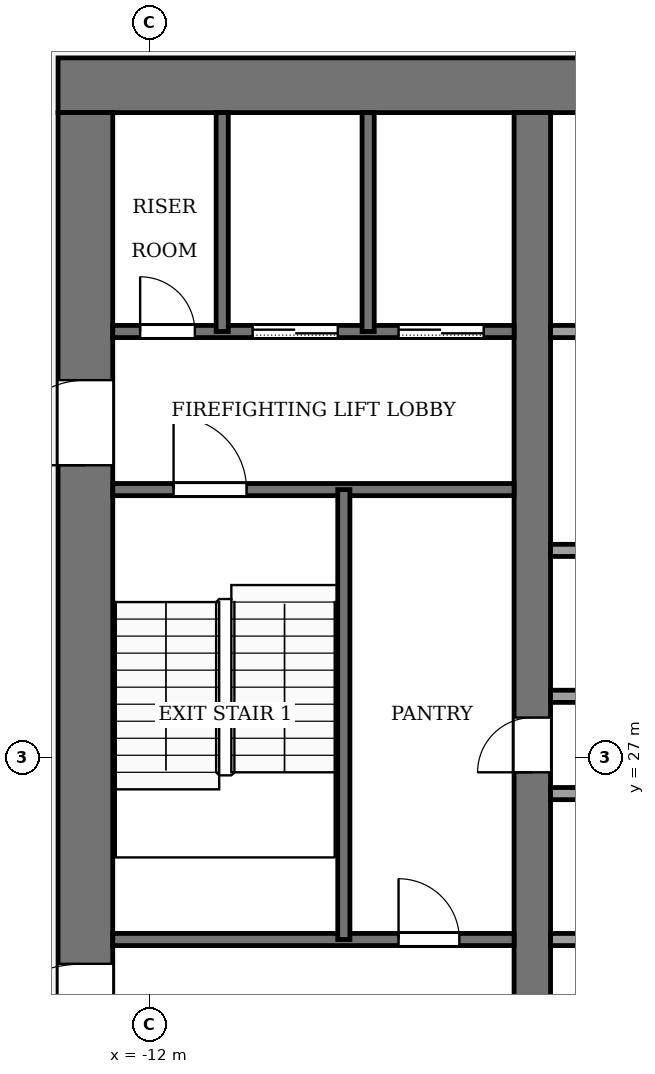
"""IFC4 building model, lengths in metres.
Left out: names, types, materials, properties, quantities, classifications, styles, units other than length and angle.
Written with IfcOpenShell. Run it as: python <this file> out.ifc"""

import sys

from ifc_helpers import new_model, si_unit, direction, frame, frame_2d, origin, place, context, subcontext, project, spatial, rectangle, extrude, element, fill, save


model = new_model("IFC4")
c1 = context("Model", 3, precision=1e-05, world=origin(), true_north=direction((0.0, 1.0)))
c2 = subcontext(c1, "Body", "Model", "MODEL_VIEW")
j1 = project(units=[si_unit("LENGTHUNIT", "METRE"), si_unit("PLANEANGLEUNIT", "RADIAN")], contexts=[c1])
p1 = place(None, origin())
s1 = spatial("IfcSite", under=j1, at=p1, CompositionType="ELEMENT")
p2 = place(p1, origin())
s2 = spatial("IfcBuilding", under=s1, at=p2, CompositionType="ELEMENT")
p3 = place(p2, frame((0.0, 0.0, 198.0)))
s3 = spatial("IfcBuildingStorey", under=s2, at=p3, CompositionType="ELEMENT", Elevation=198.0)
p4 = place(p3, frame((-13.5, 38.05, -0.13), z_axis=(0.0, 0.0, 1.0), x_axis=(1.0, 0.0, 0.0)))
e1 = element("IfcWall", 1, at=p4, inside=s3, PredefinedType="SHEAR", context=c2, shape_type="SweptSolid", body=[
    extrude(rectangle(XDim=27.0, YDim=0.9, at=frame_2d((13.5, 0.0))), origin(), (0.0, 0.0, 1.0), 4.0),
])
p5 = place(p3, frame((-13.05, 18.4, -0.13), z_axis=(0.0, 0.0, 1.0), x_axis=(0.0, 1.0, 0.0)))
e2 = element("IfcWall", 2, at=p5, inside=s3, PredefinedType="SHEAR", context=c2, shape_type="SweptSolid", body=[
    extrude(rectangle(XDim=19.2, YDim=0.9, at=frame_2d((9.6, 0.0))), origin(), (0.0, 0.0, 1.0), 4.0),
])
p6 = place(p5, frame((2.8, 0.0, 0.13)))
e3 = element("IfcOpeningElement", 3, at=p6, cuts=e2, PredefinedType="OPENING", context=c2, shape_type="SweptSolid", body=[
    extrude(rectangle(XDim=2.4, YDim=2.4, at=frame_2d((1.2, 1.2))), frame((0.0, 0.46, 0.0), z_axis=(0.0, -1.0, 0.0), x_axis=(1.0, 0.0, 0.0)), (0.0, 0.0, 1.0), 0.92),
])
p7 = place(p5, frame((13.4, 0.0, 0.13)))
e4 = element("IfcOpeningElement", 4, at=p7, cuts=e2, PredefinedType="OPENING", context=c2, shape_type="SweptSolid", body=[
    extrude(rectangle(XDim=1.4, YDim=2.2, at=frame_2d((0.7, 1.1))), frame((0.0, 0.46, 0.0), z_axis=(0.0, -1.0, 0.0), x_axis=(1.0, 0.0, 0.0)), (0.0, 0.0, 1.0), 0.92),
])
p8 = place(p3, frame((-5.7, 18.4, -0.13), z_axis=(0.0, 0.0, 1.0), x_axis=(0.0, 1.0, 0.0)))
e5 = element("IfcWall", 5, at=p8, inside=s3, PredefinedType="SHEAR", context=c2, shape_type="SweptSolid", body=[
    extrude(rectangle(XDim=19.2, YDim=0.6, at=frame_2d((9.6, 0.0))), origin(), (0.0, 0.0, 1.0), 4.0),
])
p9 = place(p8, frame((8.35, 0.0, 0.13)))
e6 = element("IfcOpeningElement", 6, at=p9, cuts=e5, PredefinedType="OPENING", context=c2, shape_type="SweptSolid", body=[
    extrude(rectangle(XDim=0.9, YDim=2.1, at=frame_2d((0.45, 1.05))), frame((0.0, 0.31, 0.0), z_axis=(0.0, -1.0, 0.0), x_axis=(1.0, 0.0, 0.0)), (0.0, 0.0, 1.0), 0.62),
])
p10 = place(p3, frame((-12.6, 24.0, 0.0), z_axis=(0.0, 0.0, 1.0), x_axis=(1.0, 0.0, 0.0)))
e7 = element("IfcWall", 7, at=p10, inside=s3, PredefinedType="PARTITIONING", context=c2, shape_type="SweptSolid", body=[
    extrude(rectangle(XDim=6.6, YDim=0.2, at=frame_2d((3.3, 0.0))), origin(), (0.0, 0.0, 1.0), 3.87),
])
p11 = place(p10, frame((4.7, 0.0, 0.0)))
e8 = element("IfcOpeningElement", 8, at=p11, cuts=e7, PredefinedType="OPENING", context=c2, shape_type="SweptSolid", body=[
    extrude(rectangle(XDim=1.0, YDim=2.1, at=frame_2d((0.5, 1.05))), frame((0.0, 0.11, 0.0), z_axis=(0.0, -1.0, 0.0), x_axis=(1.0, 0.0, 0.0)), (0.0, 0.0, 1.0), 0.22),
])
p12 = place(p3, frame((-5.4, 24.0, 0.0), z_axis=(0.0, 0.0, 1.0), x_axis=(1.0, 0.0, 0.0)))
e9 = element("IfcWall", 9, at=p12, inside=s3, PredefinedType="PARTITIONING", context=c2, shape_type="SweptSolid", body=[
    extrude(rectangle(XDim=10.8, YDim=0.2, at=frame_2d((5.4, 0.0))), origin(), (0.0, 0.0, 1.0), 3.87),
])
p13 = place(p12, frame((0.75, 0.0, 0.0)))
e10 = element("IfcOpeningElement", 10, at=p13, cuts=e9, PredefinedType="OPENING", context=c2, shape_type="SweptSolid", body=[
    extrude(rectangle(XDim=1.2, YDim=2.2, at=frame_2d((0.6, 1.1))), frame((0.0, 0.11, 0.0), z_axis=(0.0, -1.0, 0.0), x_axis=(1.0, 0.0, 0.0)), (0.0, 0.0, 1.0), 0.22),
])
p14 = place(p12, frame((3.45, 0.0, 0.0)))
e11 = element("IfcOpeningElement", 11, at=p14, cuts=e9, PredefinedType="OPENING", context=c2, shape_type="SweptSolid", body=[
    extrude(rectangle(XDim=1.2, YDim=2.2, at=frame_2d((0.6, 1.1))), frame((0.0, 0.11, 0.0), z_axis=(0.0, -1.0, 0.0), x_axis=(1.0, 0.0, 0.0)), (0.0, 0.0, 1.0), 0.22),
])
p15 = place(p12, frame((6.15, 0.0, 0.0)))
e12 = element("IfcOpeningElement", 12, at=p15, cuts=e9, PredefinedType="OPENING", context=c2, shape_type="SweptSolid", body=[
    extrude(rectangle(XDim=1.2, YDim=2.2, at=frame_2d((0.6, 1.1))), frame((0.0, 0.11, 0.0), z_axis=(0.0, -1.0, 0.0), x_axis=(1.0, 0.0, 0.0)), (0.0, 0.0, 1.0), 0.22),
])
p16 = place(p12, frame((8.85, 0.0, 0.0)))
e13 = element("IfcOpeningElement", 13, at=p16, cuts=e9, PredefinedType="OPENING", context=c2, shape_type="SweptSolid", body=[
    extrude(rectangle(XDim=1.2, YDim=2.2, at=frame_2d((0.6, 1.1))), frame((0.0, 0.11, 0.0), z_axis=(0.0, -1.0, 0.0), x_axis=(1.0, 0.0, 0.0)), (0.0, 0.0, 1.0), 0.22),
])
for number, where, z_axis, x_axis in (
    (14, (-5.4, 26.4, 0.0), (0.0, 0.0, 1.0), (1.0, 0.0, 0.0)),
    (15, (-5.4, 28.0, 0.0), (0.0, 0.0, 1.0), (1.0, 0.0, 0.0)),
):
    element("IfcWall", number, at=place(p3, frame(where, z_axis=z_axis, x_axis=x_axis)), inside=s3, PredefinedType="PARTITIONING", context=c2, shape_type="SweptSolid", body=[
        extrude(rectangle(XDim=10.8, YDim=0.2, at=frame_2d((5.4, 0.0))), origin(), (0.0, 0.0, 1.0), 3.87),
    ])
p17 = place(p3, frame((-5.4, 30.4, 0.0), z_axis=(0.0, 0.0, 1.0), x_axis=(1.0, 0.0, 0.0)))
e16 = element("IfcWall", 16, at=p17, inside=s3, PredefinedType="PARTITIONING", context=c2, shape_type="SweptSolid", body=[
    extrude(rectangle(XDim=10.8, YDim=0.2, at=frame_2d((5.4, 0.0))), origin(), (0.0, 0.0, 1.0), 3.87),
])
p18 = place(p17, frame((2.632, 0.0, 0.0)))
e17 = element("IfcOpeningElement", 17, at=p18, cuts=e16, PredefinedType="OPENING", context=c2, shape_type="SweptSolid", body=[
    extrude(rectangle(XDim=1.0, YDim=2.1, at=frame_2d((0.5, 1.05))), frame((0.0, 0.11, 0.0), z_axis=(0.0, -1.0, 0.0), x_axis=(1.0, 0.0, 0.0)), (0.0, 0.0, 1.0), 0.22),
])
p19 = place(p17, frame((8.032, 0.0, 0.0)))
e18 = element("IfcOpeningElement", 18, at=p19, cuts=e16, PredefinedType="OPENING", context=c2, shape_type="SweptSolid", body=[
    extrude(rectangle(XDim=1.0, YDim=2.1, at=frame_2d((0.5, 1.05))), frame((0.0, 0.11, 0.0), z_axis=(0.0, -1.0, 0.0), x_axis=(1.0, 0.0, 0.0)), (0.0, 0.0, 1.0), 0.22),
])
p20 = place(p3, frame((-12.6, 31.4, 0.0), z_axis=(0.0, 0.0, 1.0), x_axis=(1.0, 0.0, 0.0)))
e19 = element("IfcWall", 19, at=p20, inside=s3, PredefinedType="PARTITIONING", context=c2, shape_type="SweptSolid", body=[
    extrude(rectangle(XDim=6.6, YDim=0.2, at=frame_2d((3.3, 0.0))), origin(), (0.0, 0.0, 1.0), 3.87),
])
p21 = place(p20, frame((1.0, 0.0, 0.0)))
e20 = element("IfcOpeningElement", 20, at=p21, cuts=e19, PredefinedType="OPENING", context=c2, shape_type="SweptSolid", body=[
    extrude(rectangle(XDim=1.2, YDim=2.2, at=frame_2d((0.6, 1.1))), frame((0.0, 0.11, 0.0), z_axis=(0.0, -1.0, 0.0), x_axis=(1.0, 0.0, 0.0)), (0.0, 0.0, 1.0), 0.22),
])
p22 = place(p3, frame((-12.6, 34.0, 0.0), z_axis=(0.0, 0.0, 1.0), x_axis=(1.0, 0.0, 0.0)))
e21 = element("IfcWall", 21, at=p22, inside=s3, PredefinedType="PARTITIONING", context=c2, shape_type="SweptSolid", body=[
    extrude(rectangle(XDim=6.6, YDim=0.2, at=frame_2d((3.3, 0.0))), origin(), (0.0, 0.0, 1.0), 3.87),
])
p23 = place(p22, frame((4.7, 0.0, 0.0)))
e22 = element("IfcOpeningElement", 22, at=p23, cuts=e21, PredefinedType="OPENING", context=c2, shape_type="SweptSolid", body=[
    extrude(rectangle(XDim=1.4, YDim=2.2, at=frame_2d((0.7, 1.1))), frame((0.0, 0.11, 0.0), z_axis=(0.0, -1.0, 0.0), x_axis=(1.0, 0.0, 0.0)), (0.0, 0.0, 1.0), 0.22),
])
p24 = place(p22, frame((2.3, 0.0, 0.0)))
e23 = element("IfcOpeningElement", 23, at=p24, cuts=e21, PredefinedType="OPENING", context=c2, shape_type="SweptSolid", body=[
    extrude(rectangle(XDim=1.4, YDim=2.2, at=frame_2d((0.7, 1.1))), frame((0.0, 0.11, 0.0), z_axis=(0.0, -1.0, 0.0), x_axis=(1.0, 0.0, 0.0)), (0.0, 0.0, 1.0), 0.22),
])
p25 = place(p22, frame((0.45, 0.0, 0.0)))
e24 = element("IfcOpeningElement", 24, at=p25, cuts=e21, PredefinedType="OPENING", context=c2, shape_type="SweptSolid", body=[
    extrude(rectangle(XDim=0.9, YDim=2.1, at=frame_2d((0.45, 1.05))), frame((0.0, 0.11, 0.0), z_axis=(0.0, -1.0, 0.0), x_axis=(1.0, 0.0, 0.0)), (0.0, 0.0, 1.0), 0.22),
])
p26 = place(p3, frame((-5.4, 34.0, 0.0), z_axis=(0.0, 0.0, 1.0), x_axis=(1.0, 0.0, 0.0)))
e25 = element("IfcWall", 25, at=p26, inside=s3, PredefinedType="PARTITIONING", context=c2, shape_type="SweptSolid", body=[
    extrude(rectangle(XDim=10.8, YDim=0.2, at=frame_2d((5.4, 0.0))), origin(), (0.0, 0.0, 1.0), 3.87),
])
p27 = place(p26, frame((6.15, 0.0, 0.0)))
e26 = element("IfcOpeningElement", 26, at=p27, cuts=e25, PredefinedType="OPENING", context=c2, shape_type="SweptSolid", body=[
    extrude(rectangle(XDim=1.2, YDim=2.2, at=frame_2d((0.6, 1.1))), frame((0.0, 0.11, 0.0), z_axis=(0.0, -1.0, 0.0), x_axis=(1.0, 0.0, 0.0)), (0.0, 0.0, 1.0), 0.22),
])
p28 = place(p26, frame((8.95, 0.0, 0.0)))
e27 = element("IfcOpeningElement", 27, at=p28, cuts=e25, PredefinedType="OPENING", context=c2, shape_type="SweptSolid", body=[
    extrude(rectangle(XDim=1.0, YDim=2.1, at=frame_2d((0.5, 1.05))), frame((0.0, 0.11, 0.0), z_axis=(0.0, -1.0, 0.0), x_axis=(1.0, 0.0, 0.0)), (0.0, 0.0, 1.0), 0.22),
])
p29 = place(p3, frame((-10.8, 34.0, 0.0), z_axis=(0.0, 0.0, 1.0), x_axis=(0.0, 1.0, 0.0)))
e28 = element("IfcWall", 28, at=p29, inside=s3, PredefinedType="PARTITIONING", context=c2, shape_type="SweptSolid", body=[
    extrude(rectangle(XDim=3.6, YDim=0.2, at=frame_2d((1.8, 0.0))), origin(), (0.0, 0.0, 1.0), 3.87),
])
p30 = place(p3, frame((-8.8, 24.0, 0.0), z_axis=(0.0, 0.0, 1.0), x_axis=(0.0, 1.0, 0.0)))
e29 = element("IfcWall", 29, at=p30, inside=s3, PredefinedType="PARTITIONING", context=c2, shape_type="SweptSolid", body=[
    extrude(rectangle(XDim=7.4, YDim=0.2, at=frame_2d((3.7, 0.0))), origin(), (0.0, 0.0, 1.0), 3.87),
])
p31 = place(p3, frame((-8.4, 34.0, 0.0), z_axis=(0.0, 0.0, 1.0), x_axis=(0.0, 1.0, 0.0)))
e30 = element("IfcWall", 30, at=p31, inside=s3, PredefinedType="PARTITIONING", context=c2, shape_type="SweptSolid", body=[
    extrude(rectangle(XDim=3.6, YDim=0.2, at=frame_2d((1.8, 0.0))), origin(), (0.0, 0.0, 1.0), 3.87),
])
p32 = place(p23, origin())
e31 = element("IfcDoor", 31, at=p32, inside=s3, OperationType="SLIDING_TO_LEFT", PredefinedType="DOOR", context=c2, shape_type="SweptSolid", body=[
    extrude(rectangle(XDim=1.4, YDim=2.2, at=frame_2d((0.7, 1.1))), frame((0.0, 0.025, 0.0), z_axis=(0.0, -1.0, 0.0), x_axis=(1.0, 0.0, 0.0)), (0.0, 0.0, 1.0), 0.05),
])
fill(e22, e31)
p33 = place(p24, origin())
e32 = element("IfcDoor", 32, at=p33, inside=s3, OperationType="SLIDING_TO_LEFT", PredefinedType="DOOR", context=c2, shape_type="SweptSolid", body=[
    extrude(rectangle(XDim=1.4, YDim=2.2, at=frame_2d((0.7, 1.1))), frame((0.0, 0.025, 0.0), z_axis=(0.0, -1.0, 0.0), x_axis=(1.0, 0.0, 0.0)), (0.0, 0.0, 1.0), 0.05),
])
fill(e23, e32)
p34 = place(p25, origin())
e33 = element("IfcDoor", 33, at=p34, inside=s3, OperationType="SINGLE_SWING_RIGHT", PredefinedType="DOOR", context=c2, shape_type="SweptSolid", body=[
    extrude(rectangle(XDim=0.9, YDim=2.1, at=frame_2d((0.45, 1.05))), frame((0.0, 0.025, 0.0), z_axis=(0.0, -1.0, 0.0), x_axis=(1.0, 0.0, 0.0)), (0.0, 0.0, 1.0), 0.05),
])
fill(e24, e33)
p35 = place(p11, origin())
e34 = element("IfcDoor", 34, at=p35, inside=s3, OperationType="SINGLE_SWING_LEFT", PredefinedType="DOOR", context=c2, shape_type="SweptSolid", body=[
    extrude(rectangle(XDim=1.0, YDim=2.1, at=frame_2d((0.5, 1.05))), frame((0.0, 0.025, 0.0), z_axis=(0.0, -1.0, 0.0), x_axis=(1.0, 0.0, 0.0)), (0.0, 0.0, 1.0), 0.05),
])
fill(e8, e34)
p36 = place(p9, origin())
e35 = element("IfcDoor", 35, at=p36, inside=s3, OperationType="SINGLE_SWING_RIGHT", PredefinedType="DOOR", context=c2, shape_type="SweptSolid", body=[
    extrude(rectangle(XDim=0.9, YDim=2.1, at=frame_2d((0.45, 1.05))), frame((0.0, 0.025, 0.0), z_axis=(0.0, -1.0, 0.0), x_axis=(1.0, 0.0, 0.0)), (0.0, 0.0, 1.0), 0.05),
])
fill(e6, e35)
p37 = place(p21, origin())
e36 = element("IfcDoor", 36, at=p37, inside=s3, OperationType="SINGLE_SWING_RIGHT", PredefinedType="DOOR", context=c2, shape_type="SweptSolid", body=[
    extrude(rectangle(XDim=1.2, YDim=2.2, at=frame_2d((0.6, 1.1))), frame((0.0, 0.025, 0.0), z_axis=(0.0, -1.0, 0.0), x_axis=(1.0, 0.0, 0.0)), (0.0, 0.0, 1.0), 0.05),
])
fill(e20, e36)
p38 = place(p6, origin())
e37 = element("IfcDoor", 37, at=p38, inside=s3, OperationType="DOUBLE_DOOR_SINGLE_SWING", PredefinedType="DOOR", context=c2, shape_type="SweptSolid", body=[
    extrude(rectangle(XDim=2.4, YDim=2.4, at=frame_2d((1.2, 1.2))), frame((0.0, 0.025, 0.0), z_axis=(0.0, -1.0, 0.0), x_axis=(1.0, 0.0, 0.0)), (0.0, 0.0, 1.0), 0.05),
])
fill(e3, e37)
p39 = place(p7, origin())
e38 = element("IfcDoor", 38, at=p39, inside=s3, OperationType="SINGLE_SWING_RIGHT", PredefinedType="DOOR", context=c2, shape_type="SweptSolid", body=[
    extrude(rectangle(XDim=1.4, YDim=2.2, at=frame_2d((0.7, 1.1))), frame((0.0, 0.025, 0.0), z_axis=(0.0, -1.0, 0.0), x_axis=(1.0, 0.0, 0.0)), (0.0, 0.0, 1.0), 0.05),
])
fill(e4, e38)
save(model, sys.argv[1])
